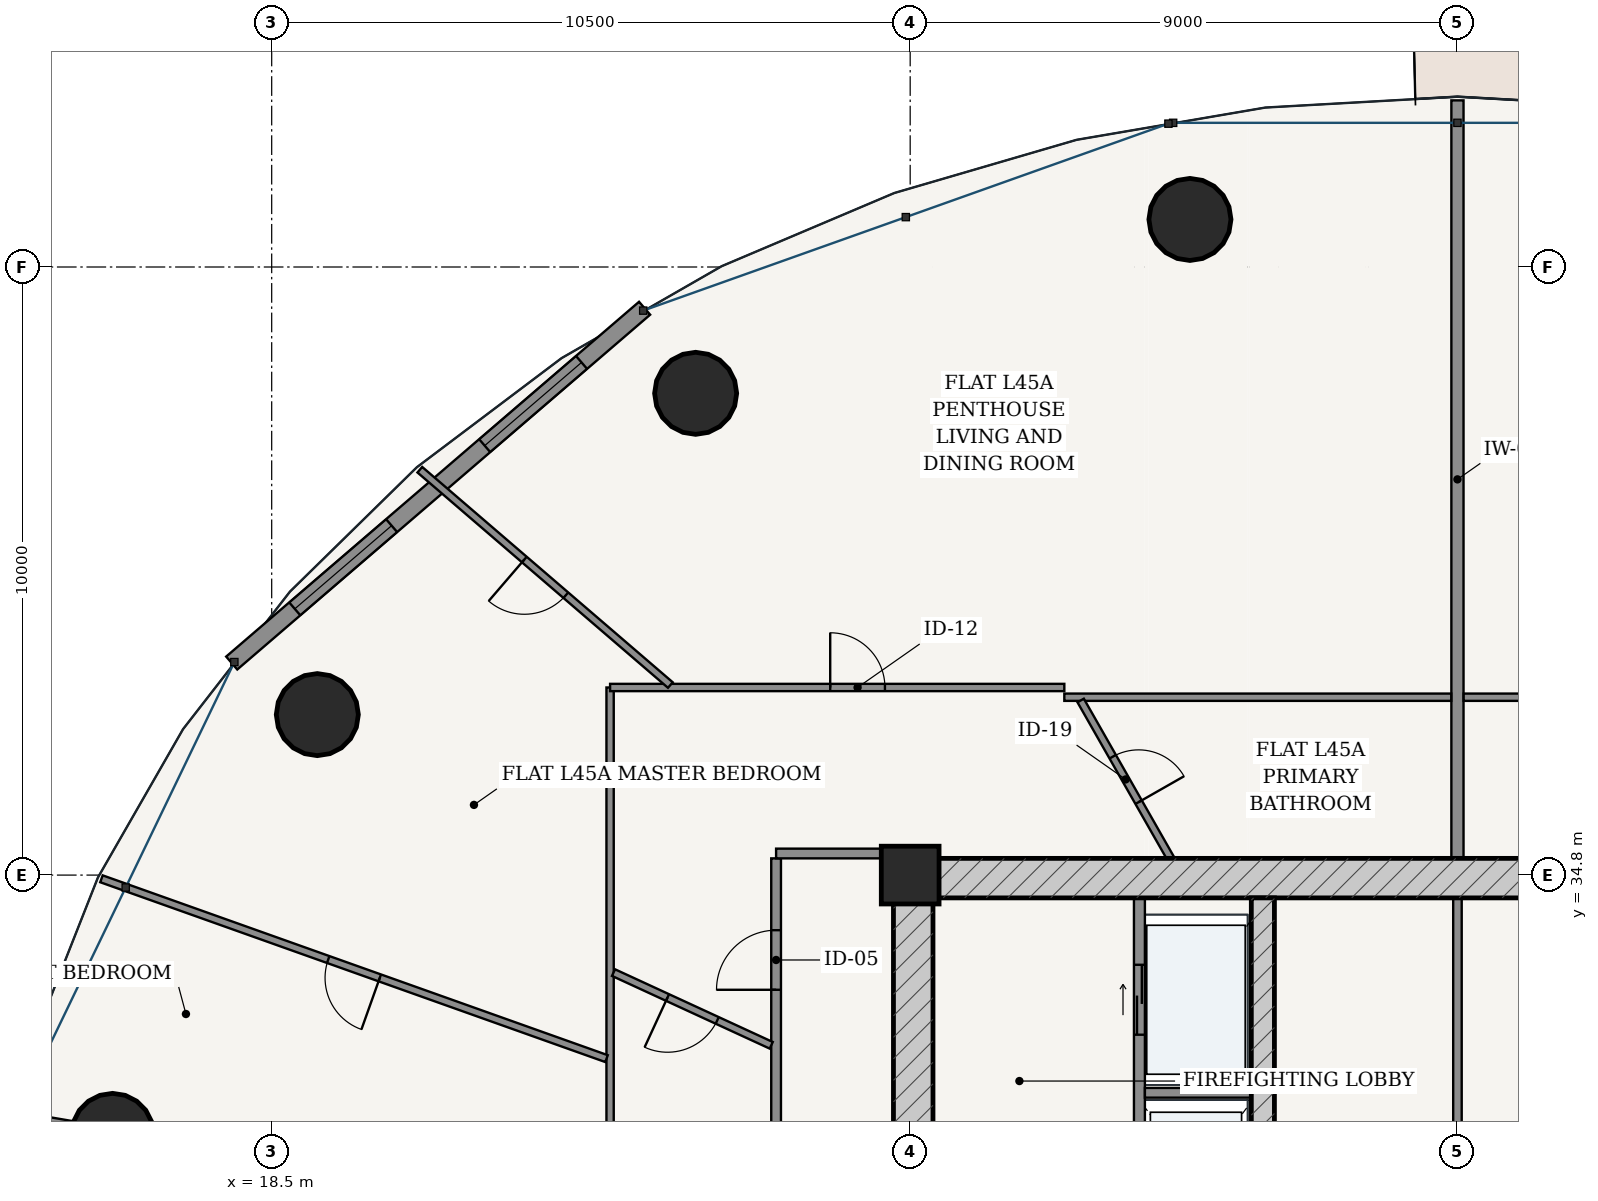
"""IFC4 building model, lengths in metres.
Left out: names, types, materials, properties, quantities, classifications, styles, units other than length and angle.
Written with IfcOpenShell. Run it as: python <this file> out.ifc"""

import sys

from ifc_helpers import new_model, si_unit, direction, frame, frame_2d, origin, origin_2d, place, context, subcontext, project, spatial, rectangle, hollow_circle, extrude, source, transform, mapped, element, fill, save


model = new_model("IFC4")
c1 = context("Model", 3, precision=1e-05, world=origin(), true_north=direction((-0.2419218956, 0.970295726276)))
c2 = subcontext(c1, "Body", "Model", "MODEL_VIEW")
j1 = project(units=[si_unit("LENGTHUNIT", "METRE"), si_unit("PLANEANGLEUNIT", "RADIAN")], contexts=[c1])
p1 = place(None, origin())
s1 = spatial("IfcSite", under=j1, at=p1, CompositionType="ELEMENT")
p2 = place(p1, origin())
s2 = spatial("IfcBuilding", under=s1, at=p2, CompositionType="ELEMENT")
p3 = place(p2, frame((0.0, 0.0, 171.4)))
s3 = spatial("IfcBuildingStorey", under=s2, at=p3, CompositionType="ELEMENT", Elevation=171.4)
p4 = place(p3, frame((29.0, 34.8, 0.0), z_axis=(0.0, 0.0, 1.0), x_axis=(1.0, 0.0, 0.0)))
e1 = element("IfcColumn", 1, at=p4, inside=s3, PredefinedType="COLUMN", context=c2, shape_type="SweptSolid", body=[
    extrude(rectangle(XDim=0.95, YDim=0.95, at=origin_2d()), origin(), (0.0, 0.0, 1.0), 3.6),
])
p5 = place(p3, frame((28.725, 34.75, 0.0), z_axis=(0.0, 0.0, 1.0), x_axis=(1.0, 0.0, 0.0)))
e2 = element("IfcWall", 2, at=p5, inside=s3, PredefinedType="SHEAR", context=c2, shape_type="SweptSolid", body=[
    extrude(rectangle(XDim=18.55, YDim=0.65, at=frame_2d((9.275, 0.0))), origin(), (0.0, 0.0, 1.0), 3.33),
])
p6 = place(p3, frame((29.05, 19.175, 0.0), z_axis=(0.0, 0.0, 1.0), x_axis=(0.0, 1.0, 0.0)))
e3 = element("IfcWall", 3, at=p6, inside=s3, PredefinedType="SHEAR", context=c2, shape_type="SweptSolid", body=[
    extrude(rectangle(XDim=15.25, YDim=0.65, at=frame_2d((7.625, 0.0))), origin(), (0.0, 0.0, 1.0), 3.33),
])
p7 = place(p6, frame((9.875, 0.0, 0.0)))
e4 = element("IfcOpeningElement", 4, at=p7, cuts=e3, PredefinedType="OPENING", context=c2, shape_type="SweptSolid", body=[
    extrude(rectangle(XDim=1.5, YDim=2.2, at=frame_2d((0.75, 1.1))), frame((0.0, 0.335, 0.0), z_axis=(0.0, -1.0, 0.0), x_axis=(1.0, 0.0, 0.0)), (0.0, 0.0, 1.0), 0.67),
])
p8 = place(p3, frame((34.8, 19.175, 0.0), z_axis=(0.0, 0.0, 1.0), x_axis=(0.0, 1.0, 0.0)))
e5 = element("IfcWall", 5, at=p8, inside=s3, PredefinedType="SHEAR", context=c2, shape_type="SweptSolid", body=[
    extrude(rectangle(XDim=15.25, YDim=0.38, at=frame_2d((7.625, 0.0))), origin(), (0.0, 0.0, 1.0), 3.33),
])
p9 = place(p8, frame((7.8, 0.0, 0.0)))
e6 = element("IfcOpeningElement", 6, at=p9, cuts=e5, PredefinedType="OPENING", context=c2, shape_type="SweptSolid", body=[
    extrude(rectangle(XDim=1.05, YDim=2.15, at=frame_2d((0.525, 1.075))), frame((0.0, 0.2, 0.0), z_axis=(0.0, -1.0, 0.0), x_axis=(1.0, 0.0, 0.0)), (0.0, 0.0, 1.0), 0.4),
])
for number, where, z_axis, x_axis in (
    (7, (33.601, 45.582, 0.0), (0.0, 0.0, 1.0), (1.0, 0.0, 0.0)),
    (8, (25.472, 42.723, 0.0), (0.0, 0.0, 1.0), (1.0, 0.0, 0.0)),
    (9, (19.25, 37.439, 0.0), (0.0, 0.0, 1.0), (1.0, 0.0, 0.0)),
    (10, (15.883, 30.536, 0.0), (0.0, 0.0, 1.0), (1.0, 0.0, 0.0)),
):
    element("IfcColumn", number, at=place(p3, frame(where, z_axis=z_axis, x_axis=x_axis)), inside=s3, PredefinedType="COLUMN", context=c2, shape_type="SweptSolid", body=[
        extrude(hollow_circle(Radius=0.675, WallThickness=0.042, at=origin_2d()), origin(), (0.0, 0.0, 1.0), 3.6),
    ])
p10 = place(p3, frame((24.633, 44.122, 0.0), z_axis=(0.0, 0.0, 1.0), x_axis=(-0.75843401647, -0.651749831348, 0.0)))
e11 = element("IfcWall", 11, at=p10, inside=s3, PredefinedType="SOLIDWALL", context=c2, shape_type="SweptSolid", body=[
    extrude(rectangle(XDim=8.952, YDim=0.28, at=frame_2d((4.476, 0.0))), origin(), (0.0, 0.0, 1.0), 3.33),
])
p11 = place(p10, frame((1.367, 0.0, 0.85)))
e12 = element("IfcOpeningElement", 12, at=p11, cuts=e11, PredefinedType="OPENING", context=c2, shape_type="SweptSolid", body=[
    extrude(rectangle(XDim=2.1, YDim=1.95, at=frame_2d((1.05, 0.975))), frame((0.0, 0.15, 0.0), z_axis=(0.0, -1.0, 0.0), x_axis=(1.0, 0.0, 0.0)), (0.0, 0.0, 1.0), 0.3),
])
p12 = place(p10, frame((5.485, 0.0, 0.85)))
e13 = element("IfcOpeningElement", 13, at=p12, cuts=e11, PredefinedType="OPENING", context=c2, shape_type="SweptSolid", body=[
    extrude(rectangle(XDim=2.1, YDim=1.95, at=frame_2d((1.05, 0.975))), frame((0.0, 0.15, 0.0), z_axis=(0.0, -1.0, 0.0), x_axis=(1.0, 0.0, 0.0)), (0.0, 0.0, 1.0), 0.3),
])
p13 = place(p3, frame((32.77, 28.52, 0.0), z_axis=(0.0, 0.0, 1.0), x_axis=(0.0, 1.0, 0.0)))
e14 = element("IfcWall", 14, at=p13, inside=s3, PredefinedType="PARTITIONING", context=c2, shape_type="SweptSolid", body=[
    extrude(rectangle(XDim=5.905, YDim=0.18, at=frame_2d((2.953, 0.0))), origin(), (0.0, 0.0, 1.0), 3.33),
])
p14 = place(p13, frame((3.655, 0.0, 0.0)))
e15 = element("IfcOpeningElement", 15, at=p14, cuts=e14, PredefinedType="OPENING", context=c2, shape_type="SweptSolid", body=[
    extrude(rectangle(XDim=1.15, YDim=2.2, at=frame_2d((0.575, 1.1))), frame((0.0, 0.1, 0.0), z_axis=(0.0, -1.0, 0.0), x_axis=(1.0, 0.0, 0.0)), (0.0, 0.0, 1.0), 0.2),
])
p15 = place(p13, frame((0.73, 0.0, 0.0)))
e16 = element("IfcOpeningElement", 16, at=p15, cuts=e14, PredefinedType="OPENING", context=c2, shape_type="SweptSolid", body=[
    extrude(rectangle(XDim=1.2, YDim=2.25, at=frame_2d((0.6, 1.125))), frame((0.0, 0.1, 0.0), z_axis=(0.0, -1.0, 0.0), x_axis=(1.0, 0.0, 0.0)), (0.0, 0.0, 1.0), 0.2),
])
p16 = place(p3, frame((32.86, 31.22, 0.0), z_axis=(0.0, 0.0, 1.0), x_axis=(1.0, 0.0, 0.0)))
e17 = element("IfcWall", 17, at=p16, inside=s3, PredefinedType="PARTITIONING", context=c2, shape_type="SweptSolid", body=[
    extrude(rectangle(XDim=1.75, YDim=0.16, at=frame_2d((0.875, 0.0))), origin(), (0.0, 0.0, 1.0), 3.33),
])
p17 = place(p3, frame((38.0, 28.56, 0.0), z_axis=(0.0, 0.0, 1.0), x_axis=(0.0, 1.0, 0.0)))
e18 = element("IfcWall", 18, at=p17, inside=s3, PredefinedType="PARTITIONING", context=c2, shape_type="SweptSolid", body=[
    extrude(rectangle(XDim=5.865, YDim=0.14, at=frame_2d((2.933, 0.0))), origin(), (0.0, 0.0, 1.0), 3.33),
])
p18 = place(p3, frame((26.795, 24.4, 0.0), z_axis=(0.0, 0.0, 1.0), x_axis=(0.0, 1.0, 0.0)))
e19 = element("IfcWall", 19, at=p18, inside=s3, PredefinedType="PARTITIONING", context=c2, shape_type="SweptSolid", body=[
    extrude(rectangle(XDim=10.675, YDim=0.16, at=frame_2d((5.337, 0.0))), origin(), (0.0, 0.0, 1.0), 2.776),
])
p19 = place(p18, frame((8.514, 0.0, 0.0)))
e20 = element("IfcOpeningElement", 20, at=p19, cuts=e19, PredefinedType="OPENING", context=c2, shape_type="SweptSolid", body=[
    extrude(rectangle(XDim=0.98, YDim=2.2, at=frame_2d((0.49, 1.1))), frame((0.0, 0.09, 0.0), z_axis=(0.0, -1.0, 0.0), x_axis=(1.0, 0.0, 0.0)), (0.0, 0.0, 1.0), 0.18),
])
p20 = place(p3, frame((26.795, 35.155, 0.0), z_axis=(0.0, 0.0, 1.0), x_axis=(1.0, 0.0, 0.0)))
e21 = element("IfcWall", 21, at=p20, inside=s3, PredefinedType="PARTITIONING", context=c2, shape_type="SweptSolid", body=[
    extrude(rectangle(XDim=1.93, YDim=0.16, at=frame_2d((0.965, 0.0))), origin(), (0.0, 0.0, 1.0), 2.776),
])
p21 = place(p3, frame((38.0, 35.075, 0.0), z_axis=(0.0, 0.0, 1.0), x_axis=(0.0, 1.0, 0.0)))
e22 = element("IfcWall", 22, at=p21, inside=s3, PredefinedType="PARTITIONING", context=c2, shape_type="SweptSolid", body=[
    extrude(rectangle(XDim=12.465, YDim=0.2, at=frame_2d((6.232, 0.0))), origin(), (0.0, 0.0, 1.0), 2.415),
])
p22 = place(p3, frame((24.065, 21.59, 0.0), z_axis=(0.0, 0.0, 1.0), x_axis=(0.0, 1.0, 0.0)))
e23 = element("IfcWall", 23, at=p22, inside=s3, PredefinedType="PARTITIONING", context=c2, shape_type="SweptSolid", body=[
    extrude(rectangle(XDim=16.295, YDim=0.12, at=frame_2d((8.147, 0.0))), origin(), (0.0, 0.0, 1.0), 2.776),
])
p23 = place(p3, frame((24.065, 37.885, 0.0), z_axis=(0.0, 0.0, 1.0), x_axis=(1.0, 0.0, 0.0)))
e24 = element("IfcWall", 24, at=p23, inside=s3, PredefinedType="PARTITIONING", context=c2, shape_type="SweptSolid", body=[
    extrude(rectangle(XDim=7.47, YDim=0.12, at=frame_2d((3.735, 0.0))), origin(), (0.0, 0.0, 1.0), 2.776),
])
p24 = place(p23, frame((3.62, 0.0, 0.0)))
e25 = element("IfcOpeningElement", 25, at=p24, cuts=e24, PredefinedType="OPENING", context=c2, shape_type="SweptSolid", body=[
    extrude(rectangle(XDim=0.9, YDim=2.15, at=frame_2d((0.45, 1.075))), frame((0.0, 0.07, 0.0), z_axis=(0.0, -1.0, 0.0), x_axis=(1.0, 0.0, 0.0)), (0.0, 0.0, 1.0), 0.14),
])
p25 = place(p3, frame((31.535, 37.725, 0.0), z_axis=(0.0, 0.0, 1.0), x_axis=(1.0, 0.0, 0.0)))
e26 = element("IfcWall", 26, at=p25, inside=s3, PredefinedType="PARTITIONING", context=c2, shape_type="SweptSolid", body=[
    extrude(rectangle(XDim=6.363, YDim=0.12, at=frame_2d((3.182, 0.0))), origin(), (0.0, 0.0, 1.0), 2.776),
])
p26 = place(p3, frame((25.056, 37.925, 0.0), z_axis=(0.0, 0.0, 1.0), x_axis=(-0.758354915574, 0.65184186888, 0.0)))
e27 = element("IfcWall", 27, at=p26, inside=s3, PredefinedType="PARTITIONING", context=c2, shape_type="SweptSolid", body=[
    extrude(rectangle(XDim=5.432, YDim=0.12, at=frame_2d((2.716, 0.0))), origin(), (0.0, 0.0, 1.0), 2.846),
])
p27 = place(p26, frame((2.266, 0.0, 0.0)))
e28 = element("IfcOpeningElement", 28, at=p27, cuts=e27, PredefinedType="OPENING", context=c2, shape_type="SweptSolid", body=[
    extrude(rectangle(XDim=0.9, YDim=2.15, at=frame_2d((0.45, 1.075))), frame((0.0, 0.07, 0.0), z_axis=(0.0, -1.0, 0.0), x_axis=(1.0, 0.0, 0.0)), (0.0, 0.0, 1.0), 0.14),
])
p28 = place(p3, frame((24.007, 31.782, 0.0), z_axis=(0.0, 0.0, 1.0), x_axis=(-0.942077868165, 0.335394231187, 0.0)))
e29 = element("IfcWall", 29, at=p28, inside=s3, PredefinedType="PARTITIONING", context=c2, shape_type="SweptSolid", body=[
    extrude(rectangle(XDim=8.817, YDim=0.12, at=frame_2d((4.408, 0.0))), origin(), (0.0, 0.0, 1.0), 2.846),
])
p29 = place(p28, frame((3.958, 0.0, 0.0)))
e30 = element("IfcOpeningElement", 30, at=p29, cuts=e29, PredefinedType="OPENING", context=c2, shape_type="SweptSolid", body=[
    extrude(rectangle(XDim=0.9, YDim=2.15, at=frame_2d((0.45, 1.075))), frame((0.0, 0.07, 0.0), z_axis=(0.0, -1.0, 0.0), x_axis=(1.0, 0.0, 0.0)), (0.0, 0.0, 1.0), 0.14),
])
p30 = place(p3, frame((24.004, 29.193, 0.0), z_axis=(0.0, 0.0, 1.0), x_axis=(-0.985698378271, 0.168519159369, 0.0)))
e31 = element("IfcWall", 31, at=p30, inside=s3, PredefinedType="PARTITIONING", context=c2, shape_type="SweptSolid", body=[
    extrude(rectangle(XDim=9.769, YDim=0.12, at=frame_2d((4.884, 0.0))), origin(), (0.0, 0.0, 1.0), 2.776),
])
p31 = place(p30, frame((3.428, 0.0, 0.0)))
e32 = element("IfcOpeningElement", 32, at=p31, cuts=e31, PredefinedType="OPENING", context=c2, shape_type="SweptSolid", body=[
    extrude(rectangle(XDim=0.9, YDim=2.15, at=frame_2d((0.45, 1.075))), frame((0.0, 0.07, 0.0), z_axis=(0.0, -1.0, 0.0), x_axis=(1.0, 0.0, 0.0)), (0.0, 0.0, 1.0), 0.14),
])
p32 = place(p3, frame((33.283, 35.075, 0.0), z_axis=(0.0, 0.0, 1.0), x_axis=(-0.495179611311, 0.868790626412, 0.0)))
e33 = element("IfcWall", 33, at=p32, inside=s3, PredefinedType="PARTITIONING", context=c2, shape_type="SweptSolid", body=[
    extrude(rectangle(XDim=2.988, YDim=0.12, at=frame_2d((1.494, 0.0))), origin(), (0.0, 0.0, 1.0), 3.33),
])
p33 = place(p32, frame((1.064, 0.0, 0.0)))
e34 = element("IfcOpeningElement", 34, at=p33, cuts=e33, PredefinedType="OPENING", context=c2, shape_type="SweptSolid", body=[
    extrude(rectangle(XDim=0.86, YDim=2.15, at=frame_2d((0.43, 1.075))), frame((0.0, 0.07, 0.0), z_axis=(0.0, -1.0, 0.0), x_axis=(1.0, 0.0, 0.0)), (0.0, 0.0, 1.0), 0.14),
])
p34 = place(p3, frame((26.715, 32.001, 0.0), z_axis=(0.0, 0.0, 1.0), x_axis=(-0.90819942915, 0.418537688735, 0.0)))
e35 = element("IfcWall", 35, at=p34, inside=s3, PredefinedType="PARTITIONING", context=c2, shape_type="SweptSolid", body=[
    extrude(rectangle(XDim=2.856, YDim=0.12, at=frame_2d((1.428, 0.0))), origin(), (0.0, 0.0, 1.0), 3.33),
])
p35 = place(p34, frame((0.978, 0.0, 0.0)))
e36 = element("IfcOpeningElement", 36, at=p35, cuts=e35, PredefinedType="OPENING", context=c2, shape_type="SweptSolid", body=[
    extrude(rectangle(XDim=0.9, YDim=2.15, at=frame_2d((0.45, 1.075))), frame((0.0, 0.07, 0.0), z_axis=(0.0, -1.0, 0.0), x_axis=(1.0, 0.0, 0.0)), (0.0, 0.0, 1.0), 0.14),
])
p36 = place(p3, frame((38.102, 37.725, 0.0), z_axis=(0.0, 0.0, 1.0), x_axis=(1.0, 0.0, 0.0)))
e37 = element("IfcWall", 37, at=p36, inside=s3, PredefinedType="PARTITIONING", context=c2, shape_type="SweptSolid", body=[
    extrude(rectangle(XDim=6.363, YDim=0.12, at=frame_2d((3.182, 0.0))), origin(), (0.0, 0.0, 1.0), 2.776),
])
m1 = source(origin(), c2, "Body", "SweptSolid", [
    extrude(rectangle(XDim=2.1, YDim=1.95, at=frame_2d((1.05, 0.975))), frame((0.0, 0.03, 0.0), z_axis=(0.0, -1.0, 0.0), x_axis=(1.0, 0.0, 0.0)), (0.0, 0.0, 1.0), 0.06),
])
p37 = place(p11, origin())
e38 = element("IfcWindow", 38, at=p37, inside=s3, PartitioningType="SINGLE_PANEL", PredefinedType="WINDOW", context=c2, shape_type="MappedRepresentation", body=[
    mapped(m1, transform((0.0, 0.0, 0.0), scale=1.0)),
])
fill(e12, e38)
p38 = place(p12, origin())
e39 = element("IfcWindow", 39, at=p38, inside=s3, PartitioningType="SINGLE_PANEL", PredefinedType="WINDOW", context=c2, shape_type="MappedRepresentation", body=[
    mapped(m1, transform((0.0, 0.0, 0.0), scale=1.0)),
])
fill(e13, e39)
m2 = source(origin(), c2, "Body", "SweptSolid", [
    extrude(rectangle(XDim=1.15, YDim=2.2, at=frame_2d((0.575, 1.1))), frame((0.0, 0.025, 0.0), z_axis=(0.0, -1.0, 0.0), x_axis=(1.0, 0.0, 0.0)), (0.0, 0.0, 1.0), 0.05),
])
p39 = place(p14, origin())
e40 = element("IfcDoor", 40, at=p39, inside=s3, OperationType="DOUBLE_DOOR_SLIDING", PredefinedType="DOOR", context=c2, shape_type="MappedRepresentation", body=[
    mapped(m2, transform((0.0, 0.0, 0.0), scale=1.0)),
])
fill(e15, e40)
m3 = source(origin(), c2, "Body", "SweptSolid", [
    extrude(rectangle(XDim=0.98, YDim=2.2, at=frame_2d((0.49, 1.1))), frame((0.0, 0.025, 0.0), z_axis=(0.0, -1.0, 0.0), x_axis=(1.0, 0.0, 0.0)), (0.0, 0.0, 1.0), 0.05),
])
p40 = place(p19, origin())
e41 = element("IfcDoor", 41, at=p40, inside=s3, OperationType="SINGLE_SWING_LEFT", PredefinedType="DOOR", context=c2, shape_type="MappedRepresentation", body=[
    mapped(m3, transform((0.0, 0.0, 0.0), scale=1.0)),
])
fill(e20, e41)
m4 = source(origin(), c2, "Body", "SweptSolid", [
    extrude(rectangle(XDim=0.86, YDim=2.15, at=frame_2d((0.43, 1.075))), frame((0.0, 0.025, 0.0), z_axis=(0.0, -1.0, 0.0), x_axis=(1.0, 0.0, 0.0)), (0.0, 0.0, 1.0), 0.05),
])
p41 = place(p33, frame((0.86, 0.0, 0.0), z_axis=(0.0, 0.0, 1.0), x_axis=(-1.0, 0.0, 0.0)))
e42 = element("IfcDoor", 42, at=p41, inside=s3, OperationType="SINGLE_SWING_RIGHT", PredefinedType="DOOR", context=c2, shape_type="MappedRepresentation", body=[
    mapped(m4, transform((0.0, 0.0, 0.0), scale=1.0)),
])
fill(e34, e42)
m5 = source(origin(), c2, "Body", "SweptSolid", [
    extrude(rectangle(XDim=0.9, YDim=2.15, at=frame_2d((0.45, 1.075))), frame((0.0, 0.025, 0.0), z_axis=(0.0, -1.0, 0.0), x_axis=(1.0, 0.0, 0.0)), (0.0, 0.0, 1.0), 0.05),
])
p42 = place(p24, origin())
e43 = element("IfcDoor", 43, at=p42, inside=s3, OperationType="SINGLE_SWING_LEFT", PredefinedType="DOOR", context=c2, shape_type="MappedRepresentation", body=[
    mapped(m5, transform((0.0, 0.0, 0.0), scale=1.0)),
])
fill(e25, e43)
p43 = place(p35, origin())
e44 = element("IfcDoor", 44, at=p43, inside=s3, OperationType="SINGLE_SWING_RIGHT", PredefinedType="DOOR", context=c2, shape_type="MappedRepresentation", body=[
    mapped(m5, transform((0.0, 0.0, 0.0), scale=1.0)),
])
fill(e36, e44)
p44 = place(p27, origin())
e45 = element("IfcDoor", 45, at=p44, inside=s3, OperationType="SINGLE_SWING_RIGHT", PredefinedType="DOOR", context=c2, shape_type="MappedRepresentation", body=[
    mapped(m5, transform((0.0, 0.0, 0.0), scale=1.0)),
])
fill(e28, e45)
p45 = place(p29, origin())
e46 = element("IfcDoor", 46, at=p45, inside=s3, OperationType="SINGLE_SWING_LEFT", PredefinedType="DOOR", context=c2, shape_type="MappedRepresentation", body=[
    mapped(m5, transform((0.0, 0.0, 0.0), scale=1.0)),
])
fill(e30, e46)
save(model, sys.argv[1])
